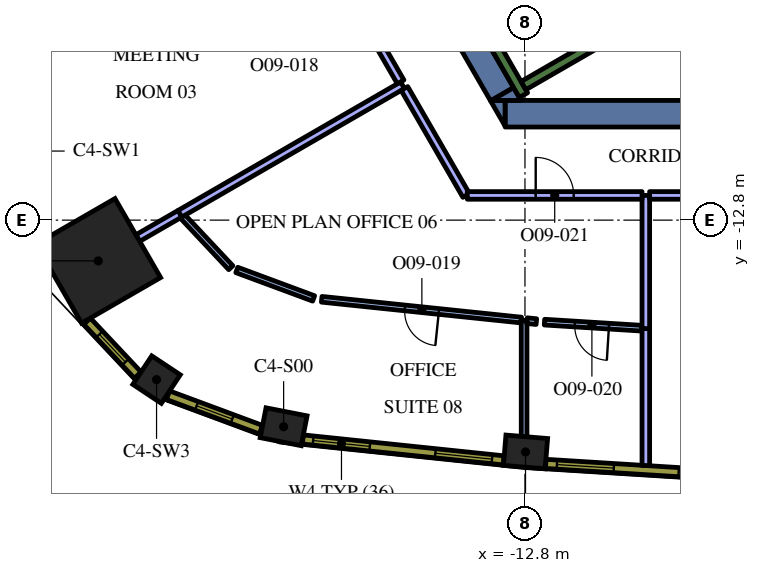
"""IFC4 building model, lengths in metres.
Left out: names, types, materials, properties, quantities, classifications, styles, units other than length and angle.
Written with IfcOpenShell. Run it as: python <this file> out.ifc"""

import sys

from ifc_helpers import new_model, si_unit, direction, frame, frame_2d, origin, origin_2d, place, context, subcontext, project, spatial, polyline, rectangle, outline, extrude, element, fill, save


model = new_model("IFC4")
c1 = context("Model", 3, precision=1e-05, world=origin(), true_north=direction((0.0, 1.0)))
c2 = subcontext(c1, "Body", "Model", "MODEL_VIEW")
j1 = project(units=[si_unit("LENGTHUNIT", "METRE"), si_unit("PLANEANGLEUNIT", "RADIAN")], contexts=[c1])
p1 = place(None, origin())
s1 = spatial("IfcSite", under=j1, at=p1, CompositionType="ELEMENT")
p2 = place(p1, origin())
s2 = spatial("IfcBuilding", under=s1, at=p2, CompositionType="ELEMENT")
p3 = place(p2, frame((0.0, 0.0, 247.8)))
s3 = spatial("IfcBuildingStorey", under=s2, at=p3, CompositionType="ELEMENT", Elevation=247.8)
p4 = place(p3, frame((-24.027, -13.872, 0.0), z_axis=(0.0, 0.0, 1.0), x_axis=(-0.866025403784, -0.5, 0.0)))
e1 = element("IfcColumn", 1, at=p4, inside=s3, PredefinedType="COLUMN", context=c2, shape_type="SweptSolid", body=[
    extrude(rectangle(XDim=2.4, YDim=2.4, at=origin_2d()), origin(), (0.0, 0.0, 1.0), 4.2),
])
for number, where, z_axis, x_axis in (
    (2, (-19.15, -18.237, 0.0), (0.0, 0.0, 1.0), (0.981, -0.192, 0.0)),
    (3, (-12.785, -18.9, 0.0), (0.0, 0.0, 1.0), (0.997, -0.083, 0.0)),
):
    element("IfcColumn", number, at=place(p3, frame(where, z_axis=z_axis, x_axis=x_axis)), inside=s3, PredefinedType="COLUMN", context=c2, shape_type="SweptSolid", body=[
        extrude(rectangle(XDim=1.1, YDim=0.8, at=origin_2d()), origin(), (0.0, 0.0, 1.0), 4.2),
    ])
p5 = place(p3, frame((-22.494, -16.997, 0.0), z_axis=(0.0, 0.0, 1.0), x_axis=(0.833238868178, -0.552913183563, 0.0)))
e4 = element("IfcColumn", 4, at=p5, inside=s3, PredefinedType="COLUMN", context=c2, shape_type="SweptSolid", body=[
    extrude(rectangle(XDim=0.9, YDim=0.9, at=origin_2d()), origin(), (0.0, 0.0, 1.0), 4.2),
])
p6 = place(p3, frame((8.904, -10.0, 0.0), z_axis=(0.0, 0.0, 1.0), x_axis=(-1.0, 0.0, 0.0)))
e5 = element("IfcWall", 5, at=p6, inside=s3, PredefinedType="SOLIDWALL", context=c2, shape_type="SweptSolid", body=[
    extrude(rectangle(XDim=22.226, YDim=0.7, at=frame_2d((11.113, 0.0))), origin(), (0.0, 0.0, 1.0), 4.2),
])
p7 = place(p3, origin())
e6 = element("IfcWall", 6, at=p7, inside=s3, PredefinedType="SOLIDWALL", context=c2, shape_type="SweptSolid", body=[
    extrude(outline(polyline([(-13.712, -9.65), (-13.324, -9.65), (-13.324, -10.322), (-13.712, -9.65)])), origin(), (0.0, 0.0, 1.0), 4.2),
])
p8 = place(p3, frame((-13.402, -9.487, 0.0), z_axis=(0.0, 0.0, 1.0), x_axis=(-0.500020498207, 0.866013568815, 0.0)))
e7 = element("IfcWall", 7, at=p8, inside=s3, PredefinedType="SOLIDWALL", context=c2, shape_type="SweptSolid", body=[
    extrude(rectangle(XDim=3.829, YDim=0.7, at=frame_2d((1.915, 0.0))), origin(), (0.0, 0.0, 1.0), 4.2),
])
e8 = element("IfcWall", 8, at=p7, inside=s3, PredefinedType="SOLIDWALL", context=c2, shape_type="SweptSolid", body=[
    extrude(outline(polyline([(-12.904, -9.65), (-13.68, -9.65), (-13.098, -9.314), (-12.904, -9.65)])), origin(), (0.0, 0.0, 1.0), 4.2),
])
p9 = place(p3, frame((-12.84, -9.511, 0.0), z_axis=(0.0, 0.0, 1.0), x_axis=(-0.499997733992, 0.866026712061, 0.0)))
e9 = element("IfcWall", 9, at=p9, inside=s3, PredefinedType="SOLIDWALL", context=c2, shape_type="SweptSolid", body=[
    extrude(rectangle(XDim=3.634, YDim=0.25, at=frame_2d((1.817, 0.0))), origin(), (0.0, 0.0, 1.0), 4.2),
])
p10 = place(p3, frame((-12.84, -9.261, 0.0), z_axis=(0.0, 0.0, 1.0), x_axis=(0.866016039709, 0.500016218704, 0.0)))
e10 = element("IfcWall", 10, at=p10, inside=s3, PredefinedType="SOLIDWALL", context=c2, shape_type="SweptSolid", body=[
    extrude(rectangle(XDim=7.05, YDim=0.25, at=frame_2d((3.525, 0.0))), origin(), (0.0, 0.0, 1.0), 4.2),
])
p11 = place(p3, frame((-9.62, -19.257, 0.0), z_axis=(0.0, 0.0, 1.0), x_axis=(0.0, 1.0, 0.0)))
e11 = element("IfcWall", 11, at=p11, inside=s3, PredefinedType="PARTITIONING", context=c2, shape_type="SweptSolid", body=[
    extrude(rectangle(XDim=3.611, YDim=0.2, at=frame_2d((1.806, 0.0))), origin(), (0.0, 0.0, 1.0), 3.45),
])
p12 = place(p3, frame((-9.62, -15.654, 0.0), z_axis=(0.0, 0.0, 1.0), x_axis=(0.0, 1.0, 0.0)))
e12 = element("IfcWall", 12, at=p12, inside=s3, PredefinedType="PARTITIONING", context=c2, shape_type="SweptSolid", body=[
    extrude(rectangle(XDim=3.504, YDim=0.2, at=frame_2d((1.752, 0.0))), origin(), (0.0, 0.0, 1.0), 3.45),
])
p13 = place(p3, frame((-9.52, -12.15, 0.0), z_axis=(0.0, 0.0, 1.0), x_axis=(1.0, 0.0, 0.0)))
e13 = element("IfcWall", 13, at=p13, inside=s3, PredefinedType="PARTITIONING", context=c2, shape_type="SweptSolid", body=[
    extrude(rectangle(XDim=2.49, YDim=0.2, at=frame_2d((1.245, 0.0))), origin(), (0.0, 0.0, 1.0), 3.45),
])
p14 = place(p3, frame((-21.873, -12.628, 0.0), z_axis=(0.0, 0.0, 1.0), x_axis=(-0.866052988967, -0.499952218018, 0.0)))
e14 = element("IfcWall", 14, at=p14, inside=s3, PredefinedType="PARTITIONING", context=c2, shape_type="SweptSolid", body=[
    extrude(rectangle(XDim=1.288, YDim=0.2, at=frame_2d((0.644, 0.0))), origin(), (0.0, 0.0, 1.0), 3.45),
])
p15 = place(p3, frame((-16.021, -9.25, 0.0), z_axis=(0.0, 0.0, 1.0), x_axis=(-0.86602692059, -0.499997372806, 0.0)))
e15 = element("IfcWall", 15, at=p15, inside=s3, PredefinedType="PARTITIONING", context=c2, shape_type="SweptSolid", body=[
    extrude(rectangle(XDim=6.765, YDim=0.2, at=frame_2d((3.382, 0.0))), origin(), (0.0, 0.0, 1.0), 3.45),
])
p16 = place(p3, frame((-17.545, -6.612, 0.0), z_axis=(0.0, 0.0, 1.0), x_axis=(0.500006981563, -0.86602137294, 0.0)))
e16 = element("IfcWall", 16, at=p16, inside=s3, PredefinedType="PARTITIONING", context=c2, shape_type="SweptSolid", body=[
    extrude(rectangle(XDim=2.946, YDim=0.2, at=frame_2d((1.473, 0.0))), origin(), (0.0, 0.0, 1.0), 3.45),
])
p17 = place(p3, frame((-12.823, -15.437, 0.0), z_axis=(0.0, 0.0, 1.0), x_axis=(0.0, -1.0, 0.0)))
e17 = element("IfcWall", 17, at=p17, inside=s3, PredefinedType="PARTITIONING", context=c2, shape_type="SweptSolid", body=[
    extrude(rectangle(XDim=3.058, YDim=0.15, at=frame_2d((1.529, 0.0))), origin(), (0.0, 0.0, 1.0), 3.45),
])
p18 = place(p3, frame((-21.806, -12.705, 0.0), z_axis=(0.0, 0.0, 1.0), x_axis=(0.684700980092, -0.728824099396, 0.0)))
e18 = element("IfcWall", 18, at=p18, inside=s3, PredefinedType="PARTITIONING", context=c2, shape_type="SweptSolid", body=[
    extrude(rectangle(XDim=1.848, YDim=0.15, at=frame_2d((0.924, 0.0))), origin(), (0.0, 0.0, 1.0), 3.45),
])
p19 = place(p3, frame((-20.383, -14.111, 0.0), z_axis=(0.0, 0.0, 1.0), x_axis=(0.937598383102, -0.347720105838, 0.0)))
e19 = element("IfcWall", 19, at=p19, inside=s3, PredefinedType="PARTITIONING", context=c2, shape_type="SweptSolid", body=[
    extrude(rectangle(XDim=2.156, YDim=0.15, at=frame_2d((1.078, 0.0))), origin(), (0.0, 0.0, 1.0), 3.45),
])
p20 = place(p3, frame((-12.898, -15.429, 0.0), z_axis=(0.0, 0.0, 1.0), x_axis=(-0.99462039429, 0.103587022653, 0.0)))
e20 = element("IfcWall", 20, at=p20, inside=s3, PredefinedType="PARTITIONING", context=c2, shape_type="SweptSolid", body=[
    extrude(rectangle(XDim=5.279, YDim=0.15, at=frame_2d((2.64, 0.0))), origin(), (0.0, 0.0, 1.0), 3.45),
])
p21 = place(p20, frame((2.179, 0.0, 0.0)))
e21 = element("IfcOpeningElement", 21, at=p21, cuts=e20, PredefinedType="OPENING", context=c2, shape_type="SweptSolid", body=[
    extrude(rectangle(XDim=0.9, YDim=2.1, at=frame_2d((0.45, 1.05))), frame((0.0, 0.085, 0.0), z_axis=(0.0, -1.0, 0.0), x_axis=(1.0, 0.0, 0.0)), (0.0, 0.0, 1.0), 0.17),
])
p22 = place(p3, frame((-12.748, -15.445, 0.0), z_axis=(0.0, 0.0, 1.0), x_axis=(0.99468140225, -0.102999553487, 0.0)))
e22 = element("IfcWall", 22, at=p22, inside=s3, PredefinedType="PARTITIONING", context=c2, shape_type="SweptSolid", body=[
    extrude(rectangle(XDim=0.249, YDim=0.15, at=frame_2d((0.125, 0.0))), origin(), (0.0, 0.0, 1.0), 3.45),
])
p23 = place(p3, frame((-9.72, -15.644, 0.0), z_axis=(0.0, 0.0, 1.0), x_axis=(-0.998064382534, 0.062189133425, 0.0)))
e23 = element("IfcWall", 23, at=p23, inside=s3, PredefinedType="PARTITIONING", context=c2, shape_type="SweptSolid", body=[
    extrude(rectangle(XDim=2.571, YDim=0.15, at=frame_2d((1.286, 0.0))), origin(), (0.0, 0.0, 1.0), 3.45),
])
p24 = place(p23, frame((0.871, 0.0, 0.0)))
e24 = element("IfcOpeningElement", 24, at=p24, cuts=e23, PredefinedType="OPENING", context=c2, shape_type="SweptSolid", body=[
    extrude(rectangle(XDim=0.9, YDim=2.1, at=frame_2d((0.45, 1.05))), frame((0.0, 0.085, 0.0), z_axis=(0.0, -1.0, 0.0), x_axis=(1.0, 0.0, 0.0)), (0.0, 0.0, 1.0), 0.17),
])
p25 = place(p3, frame((-15.971, -9.337, 0.0), z_axis=(0.0, 0.0, 1.0), x_axis=(0.500010870188, -0.866019127788, 0.0)))
e25 = element("IfcWall", 25, at=p25, inside=s3, PredefinedType="PARTITIONING", context=c2, shape_type="SweptSolid", body=[
    extrude(rectangle(XDim=3.249, YDim=0.2, at=frame_2d((1.624, 0.0))), origin(), (0.0, 0.0, 1.0), 3.45),
])
p26 = place(p3, frame((-14.317, -12.15, 0.0), z_axis=(0.0, 0.0, 1.0), x_axis=(1.0, 0.0, 0.0)))
e26 = element("IfcWall", 26, at=p26, inside=s3, PredefinedType="PARTITIONING", context=c2, shape_type="SweptSolid", body=[
    extrude(rectangle(XDim=4.597, YDim=0.2, at=frame_2d((2.299, 0.0))), origin(), (0.0, 0.0, 1.0), 3.45),
])
p27 = place(p26, frame((1.8, 0.0, 0.0)))
e27 = element("IfcOpeningElement", 27, at=p27, cuts=e26, PredefinedType="OPENING", context=c2, shape_type="SweptSolid", body=[
    extrude(rectangle(XDim=1.0, YDim=2.1, at=frame_2d((0.5, 1.05))), frame((0.0, 0.11, 0.0), z_axis=(0.0, -1.0, 0.0), x_axis=(1.0, 0.0, 0.0)), (0.0, 0.0, 1.0), 0.22),
])
p28 = place(p3, frame((-18.644, -18.571, 0.0), z_axis=(0.0, 0.0, 1.0), x_axis=(0.994621961215, -0.103571976272, 0.0)))
e28 = element("IfcWall", 28, at=p28, inside=s3, PredefinedType="SOLIDWALL", context=c2, shape_type="SweptSolid", body=[
    extrude(rectangle(XDim=5.311, YDim=0.24, at=frame_2d((2.655, 0.0))), origin(), (0.0, 0.0, 1.0), 3.95),
])
p29 = place(p28, frame((0.271, 0.0, 0.9)))
e29 = element("IfcOpeningElement", 29, at=p29, cuts=e28, PredefinedType="OPENING", context=c2, shape_type="SweptSolid", body=[
    extrude(rectangle(XDim=1.5, YDim=2.55, at=frame_2d((0.75, 1.275))), frame((0.0, 0.13, 0.0), z_axis=(0.0, -1.0, 0.0), x_axis=(1.0, 0.0, 0.0)), (0.0, 0.0, 1.0), 0.26),
])
p30 = place(p28, frame((3.504, 0.0, 0.9)))
e30 = element("IfcOpeningElement", 30, at=p30, cuts=e28, PredefinedType="OPENING", context=c2, shape_type="SweptSolid", body=[
    extrude(rectangle(XDim=1.5, YDim=2.55, at=frame_2d((0.75, 1.275))), frame((0.0, 0.13, 0.0), z_axis=(0.0, -1.0, 0.0), x_axis=(1.0, 0.0, 0.0)), (0.0, 0.0, 1.0), 0.26),
])
p31 = place(p3, frame((-12.253, -19.213, 0.0), z_axis=(0.0, 0.0, 1.0), x_axis=(0.9980633213, -0.062206162685, 0.0)))
e31 = element("IfcWall", 31, at=p31, inside=s3, PredefinedType="SOLIDWALL", context=c2, shape_type="SweptSolid", body=[
    extrude(rectangle(XDim=5.298, YDim=0.24, at=frame_2d((2.649, 0.0))), origin(), (0.0, 0.0, 1.0), 3.95),
])
p32 = place(p31, frame((0.294, 0.0, 0.9)))
e32 = element("IfcOpeningElement", 32, at=p32, cuts=e31, PredefinedType="OPENING", context=c2, shape_type="SweptSolid", body=[
    extrude(rectangle(XDim=1.5, YDim=2.55, at=frame_2d((0.75, 1.275))), frame((0.0, 0.13, 0.0), z_axis=(0.0, -1.0, 0.0), x_axis=(1.0, 0.0, 0.0)), (0.0, 0.0, 1.0), 0.26),
])
p33 = place(p31, frame((3.504, 0.0, 0.9)))
e33 = element("IfcOpeningElement", 33, at=p33, cuts=e31, PredefinedType="OPENING", context=c2, shape_type="SweptSolid", body=[
    extrude(rectangle(XDim=1.5, YDim=2.55, at=frame_2d((0.75, 1.275))), frame((0.0, 0.13, 0.0), z_axis=(0.0, -1.0, 0.0), x_axis=(1.0, 0.0, 0.0)), (0.0, 0.0, 1.0), 0.26),
])
p34 = place(p3, frame((-24.323, -15.459, 0.0), z_axis=(0.0, 0.0, 1.0), x_axis=(0.684770274166, -0.728758994194, 0.0)))
e34 = element("IfcWall", 34, at=p34, inside=s3, PredefinedType="SOLIDWALL", context=c2, shape_type="SweptSolid", body=[
    extrude(rectangle(XDim=1.948, YDim=0.24, at=frame_2d((0.974, 0.0))), origin(), (0.0, 0.0, 1.0), 3.95),
])
p35 = place(p34, frame((0.474, 0.0, 0.9)))
e35 = element("IfcOpeningElement", 35, at=p35, cuts=e34, PredefinedType="OPENING", context=c2, shape_type="SweptSolid", body=[
    extrude(rectangle(XDim=1.0, YDim=2.55, at=frame_2d((0.5, 1.275))), frame((0.0, 0.13, 0.0), z_axis=(0.0, -1.0, 0.0), x_axis=(1.0, 0.0, 0.0)), (0.0, 0.0, 1.0), 0.26),
])
p36 = place(p3, frame((-22.194, -17.406, 0.0), z_axis=(0.0, 0.0, 1.0), x_axis=(0.937569171184, -0.347798863203, 0.0)))
e36 = element("IfcWall", 36, at=p36, inside=s3, PredefinedType="SOLIDWALL", context=c2, shape_type="SweptSolid", body=[
    extrude(rectangle(XDim=2.609, YDim=0.24, at=frame_2d((1.305, 0.0))), origin(), (0.0, 0.0, 1.0), 3.95),
])
p37 = place(p36, frame((0.805, 0.0, 0.9)))
e37 = element("IfcOpeningElement", 37, at=p37, cuts=e36, PredefinedType="OPENING", context=c2, shape_type="SweptSolid", body=[
    extrude(rectangle(XDim=1.0, YDim=2.55, at=frame_2d((0.5, 1.275))), frame((0.0, 0.13, 0.0), z_axis=(0.0, -1.0, 0.0), x_axis=(1.0, 0.0, 0.0)), (0.0, 0.0, 1.0), 0.26),
])
p38 = place(p21, origin())
e38 = element("IfcDoor", 38, at=p38, inside=s3, OperationType="SINGLE_SWING_LEFT", PredefinedType="DOOR", context=c2, shape_type="SweptSolid", body=[
    extrude(rectangle(XDim=0.9, YDim=2.1, at=frame_2d((0.45, 1.05))), frame((0.0, 0.025, 0.0), z_axis=(0.0, -1.0, 0.0), x_axis=(1.0, 0.0, 0.0)), (0.0, 0.0, 1.0), 0.05),
])
fill(e21, e38)
p39 = place(p24, origin())
e39 = element("IfcDoor", 39, at=p39, inside=s3, OperationType="SINGLE_SWING_RIGHT", PredefinedType="DOOR", context=c2, shape_type="SweptSolid", body=[
    extrude(rectangle(XDim=0.9, YDim=2.1, at=frame_2d((0.45, 1.05))), frame((0.0, 0.025, 0.0), z_axis=(0.0, -1.0, 0.0), x_axis=(1.0, 0.0, 0.0)), (0.0, 0.0, 1.0), 0.05),
])
fill(e24, e39)
p40 = place(p27, origin())
e40 = element("IfcDoor", 40, at=p40, inside=s3, OperationType="SINGLE_SWING_RIGHT", PredefinedType="DOOR", context=c2, shape_type="SweptSolid", body=[
    extrude(rectangle(XDim=1.0, YDim=2.1, at=frame_2d((0.5, 1.05))), frame((0.0, 0.025, 0.0), z_axis=(0.0, -1.0, 0.0), x_axis=(1.0, 0.0, 0.0)), (0.0, 0.0, 1.0), 0.05),
])
fill(e27, e40)
p41 = place(p29, origin())
e41 = element("IfcWindow", 41, at=p41, inside=s3, PartitioningType="SINGLE_PANEL", PredefinedType="WINDOW", context=c2, shape_type="SweptSolid", body=[
    extrude(rectangle(XDim=1.5, YDim=2.55, at=frame_2d((0.75, 1.275))), frame((0.0, 0.04, 0.0), z_axis=(0.0, -1.0, 0.0), x_axis=(1.0, 0.0, 0.0)), (0.0, 0.0, 1.0), 0.06),
])
fill(e29, e41)
p42 = place(p30, origin())
e42 = element("IfcWindow", 42, at=p42, inside=s3, PartitioningType="SINGLE_PANEL", PredefinedType="WINDOW", context=c2, shape_type="SweptSolid", body=[
    extrude(rectangle(XDim=1.5, YDim=2.55, at=frame_2d((0.75, 1.275))), frame((0.0, 0.04, 0.0), z_axis=(0.0, -1.0, 0.0), x_axis=(1.0, 0.0, 0.0)), (0.0, 0.0, 1.0), 0.06),
])
fill(e30, e42)
p43 = place(p32, origin())
e43 = element("IfcWindow", 43, at=p43, inside=s3, PartitioningType="SINGLE_PANEL", PredefinedType="WINDOW", context=c2, shape_type="SweptSolid", body=[
    extrude(rectangle(XDim=1.5, YDim=2.55, at=frame_2d((0.75, 1.275))), frame((0.0, 0.04, 0.0), z_axis=(0.0, -1.0, 0.0), x_axis=(1.0, 0.0, 0.0)), (0.0, 0.0, 1.0), 0.06),
])
fill(e32, e43)
p44 = place(p33, origin())
e44 = element("IfcWindow", 44, at=p44, inside=s3, PartitioningType="SINGLE_PANEL", PredefinedType="WINDOW", context=c2, shape_type="SweptSolid", body=[
    extrude(rectangle(XDim=1.5, YDim=2.55, at=frame_2d((0.75, 1.275))), frame((0.0, 0.04, 0.0), z_axis=(0.0, -1.0, 0.0), x_axis=(1.0, 0.0, 0.0)), (0.0, 0.0, 1.0), 0.06),
])
fill(e33, e44)
p45 = place(p35, origin())
e45 = element("IfcWindow", 45, at=p45, inside=s3, PartitioningType="SINGLE_PANEL", PredefinedType="WINDOW", context=c2, shape_type="SweptSolid", body=[
    extrude(rectangle(XDim=1.0, YDim=2.55, at=frame_2d((0.5, 1.275))), frame((0.0, 0.04, 0.0), z_axis=(0.0, -1.0, 0.0), x_axis=(1.0, 0.0, 0.0)), (0.0, 0.0, 1.0), 0.06),
])
fill(e35, e45)
p46 = place(p37, origin())
e46 = element("IfcWindow", 46, at=p46, inside=s3, PartitioningType="SINGLE_PANEL", PredefinedType="WINDOW", context=c2, shape_type="SweptSolid", body=[
    extrude(rectangle(XDim=1.0, YDim=2.55, at=frame_2d((0.5, 1.275))), frame((0.0, 0.04, 0.0), z_axis=(0.0, -1.0, 0.0), x_axis=(1.0, 0.0, 0.0)), (0.0, 0.0, 1.0), 0.06),
])
fill(e37, e46)
save(model, sys.argv[1])
